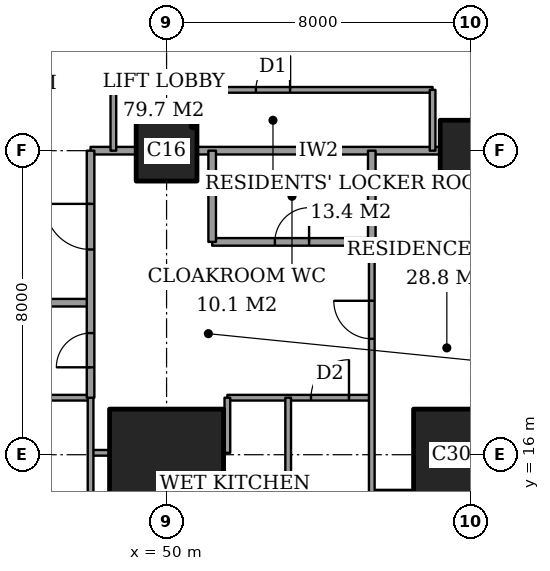
"""IFC4 building model, lengths in metres.
Left out: names, types, materials, properties, quantities, classifications, styles, units other than length and angle.
Written with IfcOpenShell. Run it as: python <this file> out.ifc"""

import sys

from ifc_helpers import new_model, si_unit, direction, frame, frame_2d, origin, origin_2d, place, context, subcontext, project, spatial, rectangle, extrude, element, fill, save


model = new_model("IFC4")
c1 = context("Model", 3, precision=1e-05, world=origin(), true_north=direction((0.0, 1.0)))
c2 = subcontext(c1, "Body", "Model", "MODEL_VIEW")
j1 = project(units=[si_unit("LENGTHUNIT", "METRE"), si_unit("PLANEANGLEUNIT", "RADIAN")], contexts=[c1])
p1 = place(None, origin())
s1 = spatial("IfcSite", under=j1, at=p1, CompositionType="ELEMENT")
p2 = place(p1, origin())
s2 = spatial("IfcBuilding", under=s1, at=p2, CompositionType="ELEMENT")
p3 = place(p2, frame((0.0, 0.0, 230.4)))
s3 = spatial("IfcBuildingStorey", under=s2, at=p3, CompositionType="ELEMENT", Elevation=230.4)
p4 = place(p3, frame((50.0, 16.0, 0.0), z_axis=(0.0, 0.0, 1.0), x_axis=(1.0, 0.0, 0.0)))
e1 = element("IfcColumn", 1, at=p4, inside=s3, PredefinedType="COLUMN", context=c2, shape_type="SweptSolid", body=[
    extrude(rectangle(XDim=3.0, YDim=2.4, at=origin_2d()), origin(), (0.0, 0.0, 1.0), 3.6),
])
p5 = place(p3, frame((50.0, 24.0, 0.0), z_axis=(0.0, 0.0, 1.0), x_axis=(1.0, 0.0, 0.0)))
e2 = element("IfcColumn", 2, at=p5, inside=s3, PredefinedType="COLUMN", context=c2, shape_type="SweptSolid", body=[
    extrude(rectangle(XDim=1.6, YDim=1.6, at=origin_2d()), origin(), (0.0, 0.0, 1.0), 3.6),
])
p6 = place(p3, frame((58.0, 16.0, 0.0), z_axis=(0.0, 0.0, 1.0), x_axis=(1.0, 0.0, 0.0)))
e3 = element("IfcColumn", 3, at=p6, inside=s3, PredefinedType="COLUMN", context=c2, shape_type="SweptSolid", body=[
    extrude(rectangle(XDim=3.0, YDim=2.4, at=origin_2d()), origin(), (0.0, 0.0, 1.0), 3.6),
])
p7 = place(p3, frame((58.0, 24.0, 0.0), z_axis=(0.0, 0.0, 1.0), x_axis=(1.0, 0.0, 0.0)))
e4 = element("IfcColumn", 4, at=p7, inside=s3, PredefinedType="COLUMN", context=c2, shape_type="SweptSolid", body=[
    extrude(rectangle(XDim=1.6, YDim=1.6, at=origin_2d()), origin(), (0.0, 0.0, 1.0), 3.6),
])
p8 = place(p3, frame((55.4, 15.0, 0.0), z_axis=(0.0, 0.0, 1.0), x_axis=(1.0, 0.0, 0.0)))
e5 = element("IfcWall", 5, at=p8, inside=s3, PredefinedType="PARTITIONING", context=c2, shape_type="SweptSolid", body=[
    extrude(rectangle(XDim=1.1, YDim=0.15, at=frame_2d((0.55, 0.0))), origin(), (0.0, 0.0, 1.0), 3.35),
])
p9 = place(p3, frame((48.0, 16.05, 0.0), z_axis=(0.0, 0.0, 1.0), x_axis=(1.0, 0.0, 0.0)))
e6 = element("IfcWall", 6, at=p9, inside=s3, PredefinedType="PARTITIONING", context=c2, shape_type="SweptSolid", body=[
    extrude(rectangle(XDim=0.5, YDim=0.15, at=frame_2d((0.25, 0.0))), origin(), (0.0, 0.0, 1.0), 2.634),
])
p10 = place(p3, frame((42.0, 17.5, 0.0), z_axis=(0.0, 0.0, 1.0), x_axis=(1.0, 0.0, 0.0)))
e7 = element("IfcWall", 7, at=p10, inside=s3, PredefinedType="PARTITIONING", context=c2, shape_type="SweptSolid", body=[
    extrude(rectangle(XDim=6.0, YDim=0.15, at=frame_2d((3.0, 0.0))), origin(), (0.0, 0.0, 1.0), 3.35),
])
p11 = place(p3, frame((51.6, 17.5, 0.0), z_axis=(0.0, 0.0, 1.0), x_axis=(1.0, 0.0, 0.0)))
e8 = element("IfcWall", 8, at=p11, inside=s3, PredefinedType="PARTITIONING", context=c2, shape_type="SweptSolid", body=[
    extrude(rectangle(XDim=3.8, YDim=0.15, at=frame_2d((1.9, 0.0))), origin(), (0.0, 0.0, 1.0), 3.35),
])
p12 = place(p11, frame((2.2, 0.0, 0.0)))
e9 = element("IfcOpeningElement", 9, at=p12, cuts=e8, PredefinedType="OPENING", context=c2, shape_type="SweptSolid", body=[
    extrude(rectangle(XDim=1.0, YDim=2.1, at=frame_2d((0.5, 1.05))), frame((0.0, 0.085, 0.0), z_axis=(0.0, -1.0, 0.0), x_axis=(1.0, 0.0, 0.0)), (0.0, 0.0, 1.0), 0.17),
])
p13 = place(p3, frame((42.0, 20.0, 0.0), z_axis=(0.0, 0.0, 1.0), x_axis=(1.0, 0.0, 0.0)))
e10 = element("IfcWall", 10, at=p13, inside=s3, PredefinedType="PARTITIONING", context=c2, shape_type="SweptSolid", body=[
    extrude(rectangle(XDim=6.0, YDim=0.2, at=frame_2d((3.0, 0.0))), origin(), (0.0, 0.0, 1.0), 3.35),
])
p14 = place(p3, frame((51.2, 21.6, 0.0), z_axis=(0.0, 0.0, 1.0), x_axis=(1.0, 0.0, 0.0)))
e11 = element("IfcWall", 11, at=p14, inside=s3, PredefinedType="PARTITIONING", context=c2, shape_type="SweptSolid", body=[
    extrude(rectangle(XDim=4.2, YDim=0.2, at=frame_2d((2.1, 0.0))), origin(), (0.0, 0.0, 1.0), 3.35),
])
p15 = place(p14, frame((1.65, 0.0, 0.0)))
e12 = element("IfcOpeningElement", 12, at=p15, cuts=e11, PredefinedType="OPENING", context=c2, shape_type="SweptSolid", body=[
    extrude(rectangle(XDim=0.9, YDim=2.1, at=frame_2d((0.45, 1.05))), frame((0.0, 0.11, 0.0), z_axis=(0.0, -1.0, 0.0), x_axis=(1.0, 0.0, 0.0)), (0.0, 0.0, 1.0), 0.22),
])
p16 = place(p3, frame((48.0, 24.0, 0.0), z_axis=(0.0, 0.0, 1.0), x_axis=(1.0, 0.0, 0.0)))
e13 = element("IfcWall", 13, at=p16, inside=s3, PredefinedType="PARTITIONING", context=c2, shape_type="SweptSolid", body=[
    extrude(rectangle(XDim=1.2, YDim=0.2, at=frame_2d((0.6, 0.0))), origin(), (0.0, 0.0, 1.0), 3.35),
])
p17 = place(p3, frame((50.8, 24.0, 0.0), z_axis=(0.0, 0.0, 1.0), x_axis=(1.0, 0.0, 0.0)))
e14 = element("IfcWall", 14, at=p17, inside=s3, PredefinedType="PARTITIONING", context=c2, shape_type="SweptSolid", body=[
    extrude(rectangle(XDim=6.4, YDim=0.2, at=frame_2d((3.2, 0.0))), origin(), (0.0, 0.0, 1.0), 3.35),
])
p18 = place(p3, frame((48.6, 25.6, 0.0), z_axis=(0.0, 0.0, 1.0), x_axis=(1.0, 0.0, 0.0)))
e15 = element("IfcWall", 15, at=p18, inside=s3, PredefinedType="PARTITIONING", context=c2, shape_type="SweptSolid", body=[
    extrude(rectangle(XDim=8.4, YDim=0.15, at=frame_2d((4.2, 0.0))), origin(), (0.0, 0.0, 1.0), 3.35),
])
p19 = place(p18, frame((3.75, 0.0, 0.0)))
e16 = element("IfcOpeningElement", 16, at=p19, cuts=e15, PredefinedType="OPENING", context=c2, shape_type="SweptSolid", body=[
    extrude(rectangle(XDim=0.9, YDim=2.1, at=frame_2d((0.45, 1.05))), frame((0.0, 0.085, 0.0), z_axis=(0.0, -1.0, 0.0), x_axis=(1.0, 0.0, 0.0)), (0.0, 0.0, 1.0), 0.17),
])
p20 = place(p3, frame((48.0, 17.5, 0.0), z_axis=(0.0, 0.0, 1.0), x_axis=(0.0, 1.0, 0.0)))
e17 = element("IfcWall", 17, at=p20, inside=s3, PredefinedType="PARTITIONING", context=c2, shape_type="SweptSolid", body=[
    extrude(rectangle(XDim=6.5, YDim=0.2, at=frame_2d((3.25, 0.0))), origin(), (0.0, 0.0, 1.0), 3.35),
])
p21 = place(p20, frame((3.9, 0.0, 0.0)))
e18 = element("IfcOpeningElement", 18, at=p21, cuts=e17, PredefinedType="OPENING", context=c2, shape_type="SweptSolid", body=[
    extrude(rectangle(XDim=1.2, YDim=2.4, at=frame_2d((0.6, 1.2))), frame((0.0, 0.11, 0.0), z_axis=(0.0, -1.0, 0.0), x_axis=(1.0, 0.0, 0.0)), (0.0, 0.0, 1.0), 0.22),
])
p22 = place(p20, frame((0.8, 0.0, 0.0)))
e19 = element("IfcOpeningElement", 19, at=p22, cuts=e17, PredefinedType="OPENING", context=c2, shape_type="SweptSolid", body=[
    extrude(rectangle(XDim=0.9, YDim=2.1, at=frame_2d((0.45, 1.05))), frame((0.0, 0.11, 0.0), z_axis=(0.0, -1.0, 0.0), x_axis=(1.0, 0.0, 0.0)), (0.0, 0.0, 1.0), 0.22),
])
p23 = place(p3, frame((48.0, 11.0, 0.0), z_axis=(0.0, 0.0, 1.0), x_axis=(0.0, 1.0, 0.0)))
e20 = element("IfcWall", 20, at=p23, inside=s3, PredefinedType="PARTITIONING", context=c2, shape_type="SweptSolid", body=[
    extrude(rectangle(XDim=6.5, YDim=0.15, at=frame_2d((3.25, 0.0))), origin(), (0.0, 0.0, 1.0), 3.35),
])
p24 = place(p3, frame((48.6, 24.0, 0.0), z_axis=(0.0, 0.0, 1.0), x_axis=(0.0, 1.0, 0.0)))
e21 = element("IfcWall", 21, at=p24, inside=s3, PredefinedType="PARTITIONING", context=c2, shape_type="SweptSolid", body=[
    extrude(rectangle(XDim=1.6, YDim=0.15, at=frame_2d((0.8, 0.0))), origin(), (0.0, 0.0, 1.0), 3.35),
])
p25 = place(p3, frame((51.2, 21.6, 0.0), z_axis=(0.0, 0.0, 1.0), x_axis=(0.0, 1.0, 0.0)))
e22 = element("IfcWall", 22, at=p25, inside=s3, PredefinedType="PARTITIONING", context=c2, shape_type="SweptSolid", body=[
    extrude(rectangle(XDim=2.4, YDim=0.2, at=frame_2d((1.2, 0.0))), origin(), (0.0, 0.0, 1.0), 3.35),
])
p26 = place(p3, frame((51.6, 16.05, 0.0), z_axis=(0.0, 0.0, 1.0), x_axis=(0.0, 1.0, 0.0)))
e23 = element("IfcWall", 23, at=p26, inside=s3, PredefinedType="PARTITIONING", context=c2, shape_type="SweptSolid", body=[
    extrude(rectangle(XDim=1.45, YDim=0.15, at=frame_2d((0.725, 0.0))), origin(), (0.0, 0.0, 1.0), 3.35),
])
p27 = place(p3, frame((53.2, 11.0, 0.0), z_axis=(0.0, 0.0, 1.0), x_axis=(0.0, 1.0, 0.0)))
e24 = element("IfcWall", 24, at=p27, inside=s3, PredefinedType="PARTITIONING", context=c2, shape_type="SweptSolid", body=[
    extrude(rectangle(XDim=6.5, YDim=0.15, at=frame_2d((3.25, 0.0))), origin(), (0.0, 0.0, 1.0), 3.35),
])
p28 = place(p3, frame((55.4, 21.6, 0.0), z_axis=(0.0, 0.0, 1.0), x_axis=(0.0, 1.0, 0.0)))
e25 = element("IfcWall", 25, at=p28, inside=s3, PredefinedType="PARTITIONING", context=c2, shape_type="SweptSolid", body=[
    extrude(rectangle(XDim=2.4, YDim=0.2, at=frame_2d((1.2, 0.0))), origin(), (0.0, 0.0, 1.0), 3.35),
])
p29 = place(p3, frame((55.4, 11.0, 0.0), z_axis=(0.0, 0.0, 1.0), x_axis=(0.0, 1.0, 0.0)))
e26 = element("IfcWall", 26, at=p29, inside=s3, PredefinedType="PARTITIONING", context=c2, shape_type="SweptSolid", body=[
    extrude(rectangle(XDim=10.6, YDim=0.15, at=frame_2d((5.3, 0.0))), origin(), (0.0, 0.0, 1.0), 3.35),
])
p30 = place(p29, frame((8.05, 0.0, 0.0)))
e27 = element("IfcOpeningElement", 27, at=p30, cuts=e26, PredefinedType="OPENING", context=c2, shape_type="SweptSolid", body=[
    extrude(rectangle(XDim=1.0, YDim=2.1, at=frame_2d((0.5, 1.05))), frame((0.0, 0.085, 0.0), z_axis=(0.0, -1.0, 0.0), x_axis=(1.0, 0.0, 0.0)), (0.0, 0.0, 1.0), 0.17),
])
p31 = place(p3, frame((57.0, 24.0, 0.0), z_axis=(0.0, 0.0, 1.0), x_axis=(0.0, 1.0, 0.0)))
e28 = element("IfcWall", 28, at=p31, inside=s3, PredefinedType="PARTITIONING", context=c2, shape_type="SweptSolid", body=[
    extrude(rectangle(XDim=1.6, YDim=0.15, at=frame_2d((0.8, 0.0))), origin(), (0.0, 0.0, 1.0), 3.35),
])
p32 = place(p30, origin())
e29 = element("IfcDoor", 29, at=p32, inside=s3, OperationType="SINGLE_SWING_LEFT", PredefinedType="DOOR", context=c2, shape_type="SweptSolid", body=[
    extrude(rectangle(XDim=1.0, YDim=2.1, at=frame_2d((0.5, 1.05))), frame((0.0, 0.025, 0.0), z_axis=(0.0, -1.0, 0.0), x_axis=(1.0, 0.0, 0.0)), (0.0, 0.0, 1.0), 0.05),
])
fill(e27, e29)
p33 = place(p15, origin())
e30 = element("IfcDoor", 30, at=p33, inside=s3, OperationType="SINGLE_SWING_LEFT", PredefinedType="DOOR", context=c2, shape_type="SweptSolid", body=[
    extrude(rectangle(XDim=0.9, YDim=2.1, at=frame_2d((0.45, 1.05))), frame((0.0, 0.025, 0.0), z_axis=(0.0, -1.0, 0.0), x_axis=(1.0, 0.0, 0.0)), (0.0, 0.0, 1.0), 0.05),
])
fill(e12, e30)
p34 = place(p21, origin())
e31 = element("IfcDoor", 31, at=p34, inside=s3, OperationType="SINGLE_SWING_LEFT", PredefinedType="DOOR", context=c2, shape_type="SweptSolid", body=[
    extrude(rectangle(XDim=1.2, YDim=2.4, at=frame_2d((0.6, 1.2))), frame((0.0, 0.025, 0.0), z_axis=(0.0, -1.0, 0.0), x_axis=(1.0, 0.0, 0.0)), (0.0, 0.0, 1.0), 0.05),
])
fill(e18, e31)
p35 = place(p12, origin())
e32 = element("IfcDoor", 32, at=p35, inside=s3, OperationType="SINGLE_SWING_LEFT", PredefinedType="DOOR", context=c2, shape_type="SweptSolid", body=[
    extrude(rectangle(XDim=1.0, YDim=2.1, at=frame_2d((0.5, 1.05))), frame((0.0, 0.025, 0.0), z_axis=(0.0, -1.0, 0.0), x_axis=(1.0, 0.0, 0.0)), (0.0, 0.0, 1.0), 0.05),
])
fill(e9, e32)
p36 = place(p22, origin())
e33 = element("IfcDoor", 33, at=p36, inside=s3, OperationType="SINGLE_SWING_RIGHT", PredefinedType="DOOR", context=c2, shape_type="SweptSolid", body=[
    extrude(rectangle(XDim=0.9, YDim=2.1, at=frame_2d((0.45, 1.05))), frame((0.0, 0.025, 0.0), z_axis=(0.0, -1.0, 0.0), x_axis=(1.0, 0.0, 0.0)), (0.0, 0.0, 1.0), 0.05),
])
fill(e19, e33)
p37 = place(p19, origin())
e34 = element("IfcDoor", 34, at=p37, inside=s3, OperationType="SINGLE_SWING_LEFT", PredefinedType="DOOR", context=c2, shape_type="SweptSolid", body=[
    extrude(rectangle(XDim=0.9, YDim=2.1, at=frame_2d((0.45, 1.05))), frame((0.0, 0.025, 0.0), z_axis=(0.0, -1.0, 0.0), x_axis=(1.0, 0.0, 0.0)), (0.0, 0.0, 1.0), 0.05),
])
fill(e16, e34)
save(model, sys.argv[1])
